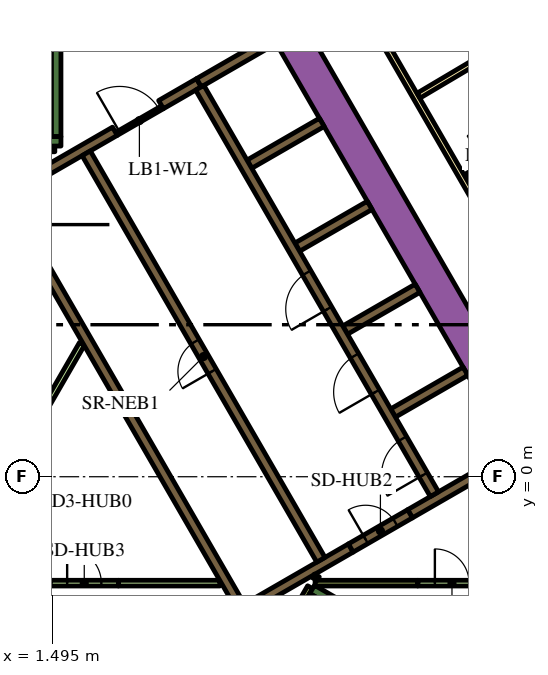
"""IFC4 building model, lengths in metres.
Left out: names, types, materials, properties, quantities, classifications, styles, units other than length and angle.
Written with IfcOpenShell. Run it as: python <this file> out.ifc"""

import sys

from ifc_helpers import new_model, si_unit, direction, frame, frame_2d, origin, place, context, subcontext, project, spatial, polyline, rectangle, outline, extrude, element, fill, save


model = new_model("IFC4")
c1 = context("Model", 3, precision=1e-05, world=origin(), true_north=direction((0.0, 1.0)))
c2 = subcontext(c1, "Body", "Model", "MODEL_VIEW")
j1 = project(units=[si_unit("LENGTHUNIT", "METRE"), si_unit("PLANEANGLEUNIT", "RADIAN")], contexts=[c1])
p1 = place(None, origin())
s1 = spatial("IfcSite", under=j1, at=p1, CompositionType="ELEMENT")
p2 = place(p1, origin())
s2 = spatial("IfcBuilding", under=s1, at=p2, CompositionType="ELEMENT")
p3 = place(p2, frame((0.0, 0.0, 126.6)))
s3 = spatial("IfcBuildingStorey", under=s2, at=p3, CompositionType="ELEMENT", Elevation=126.6)
p4 = place(p3, frame((6.776, 13.364, 0.0), z_axis=(0.0, 0.0, 1.0), x_axis=(0.500004177138, -0.8660229921, 0.0)))
e1 = element("IfcWall", 1, at=p4, inside=s3, PredefinedType="SOLIDWALL", context=c2, shape_type="SweptSolid", body=[
    extrude(rectangle(XDim=20.204, YDim=0.9, at=frame_2d((10.102, 0.0))), origin(), (0.0, 0.0, 1.0), 3.9),
])
p5 = place(p3, frame((8.334, -2.964, 0.0), z_axis=(0.0, 0.0, 1.0), x_axis=(0.866016039709, -0.500016218704, 0.0)))
e2 = element("IfcWall", 2, at=p5, inside=s3, PredefinedType="SOLIDWALL", context=c2, shape_type="SweptSolid", body=[
    extrude(rectangle(XDim=7.05, YDim=0.25, at=frame_2d((3.525, 0.0))), origin(), (0.0, 0.0, 1.0), 3.9),
])
p6 = place(p3, frame((8.163, -3.511, 0.0), z_axis=(0.0, 0.0, 1.0), x_axis=(0.500127794843, 0.865951608824, 0.0)))
e3 = element("IfcWall", 3, at=p6, inside=s3, PredefinedType="SOLIDWALL", context=c2, shape_type="SweptSolid", body=[
    extrude(rectangle(XDim=0.435, YDim=0.25, at=frame_2d((0.217, 0.0))), origin(), (0.0, 0.0, 1.0), 3.9),
])
p7 = place(p3, frame((1.6, 8.95, 0.0), z_axis=(0.0, 0.0, 1.0), x_axis=(0.0, 1.0, 0.0)))
e4 = element("IfcWall", 4, at=p7, inside=s3, PredefinedType="SOLIDWALL", context=c2, shape_type="SweptSolid", body=[
    extrude(rectangle(XDim=6.8, YDim=0.25, at=frame_2d((3.4, 0.0))), origin(), (0.0, 0.0, 1.0), 3.9),
])
p8 = place(p3, frame((1.05, 8.825, 0.0), z_axis=(0.0, 0.0, 1.0), x_axis=(1.0, 0.0, 0.0)))
e5 = element("IfcWall", 5, at=p8, inside=s3, PredefinedType="SOLIDWALL", context=c2, shape_type="SweptSolid", body=[
    extrude(rectangle(XDim=0.675, YDim=0.25, at=frame_2d((0.337, 0.0))), origin(), (0.0, 0.0, 1.0), 3.9),
])
p9 = place(p3, frame((10.464, 1.677, 0.0), z_axis=(0.0, 0.0, 1.0), x_axis=(0.86605622881, 0.499946605688, 0.0)))
e6 = element("IfcWall", 6, at=p9, inside=s3, PredefinedType="SOLIDWALL", context=c2, shape_type="SweptSolid", body=[
    extrude(rectangle(XDim=2.2, YDim=0.25, at=frame_2d((1.1, 0.0))), origin(), (0.0, 0.0, 1.0), 3.9),
])
p10 = place(p3, origin())
e7 = element("IfcWall", 7, at=p10, inside=s3, PredefinedType="SOLIDWALL", context=c2, shape_type="SweptSolid", body=[
    extrude(outline(polyline([(0.335, 6.925), (0.335, 6.925), (0.335, 7.075), (0.335, 7.075), (0.335, 7.075), (0.245, 7.075), (0.079, 7.363), (0.035, 7.439), (0.252, 7.564), (0.377, 7.348), (6.552, -3.348), (6.677, -3.564), (6.46, -3.689), (4.897, -0.981), (0.332, 6.925), (0.335, 6.925), (0.335, 6.925)])), origin(), (0.0, 0.0, 1.0), 3.9),
])
p11 = place(p3, frame((4.358, 9.791, 0.0), z_axis=(0.0, 0.0, 1.0), x_axis=(0.866079547155, 0.499906209203, 0.0)))
e8 = element("IfcWall", 8, at=p11, inside=s3, PredefinedType="SOLIDWALL", context=c2, shape_type="SweptSolid", body=[
    extrude(rectangle(XDim=1.15, YDim=0.25, at=frame_2d((0.575, 0.0))), origin(), (0.0, 0.0, 1.0), 3.9),
])
p12 = place(p3, frame((5.356, 10.367, 0.0), z_axis=(0.0, 0.0, 1.0), x_axis=(0.865978535641, 0.50008116922, 0.0)))
e9 = element("IfcWall", 9, at=p12, inside=s3, PredefinedType="SOLIDWALL", context=c2, shape_type="SweptSolid", body=[
    extrude(rectangle(XDim=2.278, YDim=0.25, at=frame_2d((1.139, 0.0))), origin(), (0.0, 0.0, 1.0), 3.9),
])
p13 = place(p3, frame((0.314, 7.456, 0.0), z_axis=(0.0, 0.0, 1.0), x_axis=(0.866013897511, 0.50001992892, 0.0)))
e10 = element("IfcWall", 10, at=p13, inside=s3, PredefinedType="SOLIDWALL", context=c2, shape_type="SweptSolid", body=[
    extrude(rectangle(XDim=3.268, YDim=0.25, at=frame_2d((1.634, 0.0))), origin(), (0.0, 0.0, 1.0), 3.9),
])
p14 = place(p3, frame((9.352, -1.875, 0.0), z_axis=(0.0, 0.0, 1.0), x_axis=(-0.866024844342, -0.500000968981, 0.0)))
e11 = element("IfcWall", 11, at=p14, inside=s3, PredefinedType="SOLIDWALL", context=c2, shape_type="SweptSolid", body=[
    extrude(rectangle(XDim=3.162, YDim=0.25, at=frame_2d((1.581, 0.0))), origin(), (0.0, 0.0, 1.0), 3.9),
])
for number, where, z_axis, x_axis in (
    (12, (6.684, 8.224, 0.0), (0.0, 0.0, 1.0), (0.866, 0.5, 0.0)),
    (13, (7.944, 6.041, 0.0), (0.0, 0.0, 1.0), (0.866, 0.5, 0.0)),
    (14, (9.204, 3.859, 0.0), (0.0, 0.0, 1.0), (0.866, 0.5, 0.0)),
):
    element("IfcWall", number, at=place(p3, frame(where, z_axis=z_axis, x_axis=x_axis)), inside=s3, PredefinedType="SOLIDWALL", context=c2, shape_type="SweptSolid", body=[
        extrude(rectangle(XDim=2.2, YDim=0.25, at=frame_2d((1.1, 0.0))), origin(), (0.0, 0.0, 1.0), 3.9),
    ])
p15 = place(p3, frame((10.911, -0.975, 0.0), z_axis=(0.0, 0.0, 1.0), x_axis=(0.866046979468, 0.499962627957, 0.0)))
e15 = element("IfcWall", 15, at=p15, inside=s3, PredefinedType="SOLIDWALL", context=c2, shape_type="SweptSolid", body=[
    extrude(rectangle(XDim=3.138, YDim=0.25, at=frame_2d((1.569, 0.0))), origin(), (0.0, 0.0, 1.0), 3.9),
])
p16 = place(p3, frame((8.412, -2.8, 0.0), z_axis=(0.0, 0.0, 1.0), x_axis=(1.0, 0.0, 0.0)))
e16 = element("IfcWall", 16, at=p16, inside=s3, PredefinedType="PARTITIONING", context=c2, shape_type="SweptSolid", body=[
    extrude(rectangle(XDim=2.702, YDim=0.15, at=frame_2d((1.351, 0.0))), origin(), (0.0, 0.0, 1.0), 3.9),
])
p17 = place(p3, frame((8.459, -2.599, 0.0), z_axis=(0.0, 0.0, 1.0), x_axis=(-0.501919277433, -0.864914469148, 0.0)))
e17 = element("IfcWall", 17, at=p17, inside=s3, PredefinedType="PARTITIONING", context=c2, shape_type="SweptSolid", body=[
    extrude(rectangle(XDim=0.109, YDim=0.15, at=frame_2d((0.054, 0.0))), origin(), (0.0, 0.0, 1.0), 3.9),
])
p18 = place(p3, frame((8.281, -2.907, 0.0), z_axis=(0.0, 0.0, 1.0), x_axis=(-0.500193841991, -0.86591346013, 0.0)))
e18 = element("IfcWall", 18, at=p18, inside=s3, PredefinedType="PARTITIONING", context=c2, shape_type="SweptSolid", body=[
    extrude(rectangle(XDim=0.583, YDim=0.15, at=frame_2d((0.292, 0.0))), origin(), (0.0, 0.0, 1.0), 3.9),
])
p19 = place(p3, frame((3.238, -2.8, 0.0), z_axis=(0.0, 0.0, 1.0), x_axis=(1.0, 0.0, 0.0)))
e19 = element("IfcWall", 19, at=p19, inside=s3, PredefinedType="PARTITIONING", context=c2, shape_type="SweptSolid", body=[
    extrude(rectangle(XDim=2.672, YDim=0.15, at=frame_2d((1.336, 0.0))), origin(), (0.0, 0.0, 1.0), 2.75),
])
p20 = place(p3, frame((1.016, 1.309, 0.0), z_axis=(0.0, 0.0, 1.0), x_axis=(0.49998231768, 0.866035612436, 0.0)))
e20 = element("IfcWall", 20, at=p20, inside=s3, PredefinedType="PARTITIONING", context=c2, shape_type="SweptSolid", body=[
    extrude(rectangle(XDim=2.521, YDim=0.15, at=frame_2d((1.26, 0.0))), origin(), (0.0, 0.0, 1.0), 2.75),
])
p21 = place(p3, frame((1.05, 8.625, 0.0), z_axis=(0.0, 0.0, 1.0), x_axis=(1.0, 0.0, 0.0)))
e21 = element("IfcWall", 21, at=p21, inside=s3, PredefinedType="PARTITIONING", context=c2, shape_type="SweptSolid", body=[
    extrude(rectangle(XDim=0.514, YDim=0.15, at=frame_2d((0.257, 0.0))), origin(), (0.0, 0.0, 1.0), 2.75),
])
p22 = place(p3, frame((11.553, -0.46, 0.0), z_axis=(0.0, 0.0, 1.0), x_axis=(-0.500006514828, 0.866021642414, 0.0)))
e22 = element("IfcWall", 22, at=p22, inside=s3, PredefinedType="SOLIDWALL", context=c2, shape_type="SweptSolid", body=[
    extrude(rectangle(XDim=12.35, YDim=0.25, at=frame_2d((6.175, 0.0))), origin(), (0.0, 0.0, 1.0), 3.9),
])
p23 = place(p22, frame((0.585, 0.0, 0.0)))
e23 = element("IfcOpeningElement", 23, at=p23, cuts=e22, PredefinedType="OPENING", context=c2, shape_type="SweptSolid", body=[
    extrude(rectangle(XDim=1.1, YDim=2.1, at=frame_2d((0.55, 1.05))), frame((0.0, 0.135, 0.0), z_axis=(0.0, -1.0, 0.0), x_axis=(1.0, 0.0, 0.0)), (0.0, 0.0, 1.0), 0.27),
])
p24 = place(p22, frame((3.105, 0.0, 0.0)))
e24 = element("IfcOpeningElement", 24, at=p24, cuts=e22, PredefinedType="OPENING", context=c2, shape_type="SweptSolid", body=[
    extrude(rectangle(XDim=1.1, YDim=2.1, at=frame_2d((0.55, 1.05))), frame((0.0, 0.135, 0.0), z_axis=(0.0, -1.0, 0.0), x_axis=(1.0, 0.0, 0.0)), (0.0, 0.0, 1.0), 0.27),
])
p25 = place(p22, frame((5.625, 0.0, 0.0)))
e25 = element("IfcOpeningElement", 25, at=p25, cuts=e22, PredefinedType="OPENING", context=c2, shape_type="SweptSolid", body=[
    extrude(rectangle(XDim=1.1, YDim=2.1, at=frame_2d((0.55, 1.05))), frame((0.0, 0.135, 0.0), z_axis=(0.0, -1.0, 0.0), x_axis=(1.0, 0.0, 0.0)), (0.0, 0.0, 1.0), 0.27),
])
p26 = place(p3, frame((8.565, -2.185, 0.0), z_axis=(0.0, 0.0, 1.0), x_axis=(-0.499997954832, 0.866026584559, 0.0)))
e26 = element("IfcWall", 26, at=p26, inside=s3, PredefinedType="SOLIDWALL", context=c2, shape_type="SweptSolid", body=[
    extrude(rectangle(XDim=12.35, YDim=0.25, at=frame_2d((6.175, 0.0))), origin(), (0.0, 0.0, 1.0), 3.9),
])
p27 = place(p26, frame((5.725, 0.0, 0.0)))
e27 = element("IfcOpeningElement", 27, at=p27, cuts=e26, PredefinedType="OPENING", context=c2, shape_type="SweptSolid", body=[
    extrude(rectangle(XDim=0.9, YDim=2.1, at=frame_2d((0.45, 1.05))), frame((0.0, 0.135, 0.0), z_axis=(0.0, -1.0, 0.0), x_axis=(1.0, 0.0, 0.0)), (0.0, 0.0, 1.0), 0.27),
])
p28 = place(p3, frame((3.183, 9.02, 0.0), z_axis=(0.0, 0.0, 1.0), x_axis=(0.866034573852, 0.49998411664, 0.0)))
e28 = element("IfcWall", 28, at=p28, inside=s3, PredefinedType="PARTITIONING", context=c2, shape_type="SweptSolid", body=[
    extrude(rectangle(XDim=1.4, YDim=0.09, at=frame_2d((0.7, 0.0))), origin(), (0.0, 0.0, 1.0), 2.75),
])
p29 = place(p28, frame((0.1, 0.0, 0.0)))
e29 = element("IfcOpeningElement", 29, at=p29, cuts=e28, PredefinedType="OPENING", context=c2, shape_type="SweptSolid", body=[
    extrude(rectangle(XDim=1.2, YDim=2.1, at=frame_2d((0.6, 1.05))), frame((0.0, 0.055, 0.0), z_axis=(0.0, -1.0, 0.0), x_axis=(1.0, 0.0, 0.0)), (0.0, 0.0, 1.0), 0.11),
])
p30 = place(p3, frame((9.352, -1.875, 0.0), z_axis=(0.0, 0.0, 1.0), x_axis=(0.865989075817, 0.500062916607, 0.0)))
e30 = element("IfcWall", 30, at=p30, inside=s3, PredefinedType="SOLIDWALL", context=c2, shape_type="SweptSolid", body=[
    extrude(rectangle(XDim=1.8, YDim=0.25, at=frame_2d((0.9, 0.0))), origin(), (0.0, 0.0, 1.0), 3.9),
])
p31 = place(p30, frame((0.45, 0.0, 0.0)))
e31 = element("IfcOpeningElement", 31, at=p31, cuts=e30, PredefinedType="OPENING", context=c2, shape_type="SweptSolid", body=[
    extrude(rectangle(XDim=0.9, YDim=2.1, at=frame_2d((0.45, 1.05))), frame((0.0, 0.135, 0.0), z_axis=(0.0, -1.0, 0.0), x_axis=(1.0, 0.0, 0.0)), (0.0, 0.0, 1.0), 0.27),
])
p32 = place(p3, frame((1.438, -2.8, 0.0), z_axis=(0.0, 0.0, 1.0), x_axis=(1.0, 0.0, 0.0)))
e32 = element("IfcWall", 32, at=p32, inside=s3, PredefinedType="PARTITIONING", context=c2, shape_type="SweptSolid", body=[
    extrude(rectangle(XDim=1.8, YDim=0.15, at=frame_2d((0.9, 0.0))), origin(), (0.0, 0.0, 1.0), 2.75),
])
p33 = place(p32, frame((0.45, 0.0, 0.0)))
e33 = element("IfcOpeningElement", 33, at=p33, cuts=e32, PredefinedType="OPENING", context=c2, shape_type="SweptSolid", body=[
    extrude(rectangle(XDim=0.9, YDim=2.1, at=frame_2d((0.45, 1.05))), frame((0.0, 0.085, 0.0), z_axis=(0.0, -1.0, 0.0), x_axis=(1.0, 0.0, 0.0)), (0.0, 0.0, 1.0), 0.17),
])
p34 = place(p3, frame((11.115, -2.8, 0.0), z_axis=(0.0, 0.0, 1.0), x_axis=(1.0, 0.0, 0.0)))
e34 = element("IfcWall", 34, at=p34, inside=s3, PredefinedType="PARTITIONING", context=c2, shape_type="SweptSolid", body=[
    extrude(rectangle(XDim=1.8, YDim=0.15, at=frame_2d((0.9, 0.0))), origin(), (0.0, 0.0, 1.0), 2.75),
])
p35 = place(p34, frame((0.45, 0.0, 0.0)))
e35 = element("IfcOpeningElement", 35, at=p35, cuts=e34, PredefinedType="OPENING", context=c2, shape_type="SweptSolid", body=[
    extrude(rectangle(XDim=0.9, YDim=2.1, at=frame_2d((0.45, 1.05))), frame((0.0, 0.085, 0.0), z_axis=(0.0, -1.0, 0.0), x_axis=(1.0, 0.0, 0.0)), (0.0, 0.0, 1.0), 0.17),
])
p36 = place(p3, frame((6.163, 18.475, 0.0), z_axis=(0.0, 0.0, 1.0), x_axis=(0.500001317485, -0.866024643133, 0.0)))
e36 = element("IfcWall", 36, at=p36, inside=s3, PredefinedType="PARTITIONING", context=c2, shape_type="SweptSolid", body=[
    extrude(rectangle(XDim=25.767, YDim=0.15, at=frame_2d((12.883, 0.0))), origin(), (0.0, 0.0, 1.0), 2.75),
])
p37 = place(p36, frame((19.306, 0.0, 0.0)))
e37 = element("IfcOpeningElement", 37, at=p37, cuts=e36, PredefinedType="OPENING", context=c2, shape_type="SweptSolid", body=[
    extrude(rectangle(XDim=1.0, YDim=2.1, at=frame_2d((0.5, 1.05))), frame((0.0, 0.085, 0.0), z_axis=(0.0, -1.0, 0.0), x_axis=(1.0, 0.0, 0.0)), (0.0, 0.0, 1.0), 0.17),
])
p38 = place(p36, frame((17.999, 0.0, 0.0)))
e38 = element("IfcOpeningElement", 38, at=p38, cuts=e36, PredefinedType="OPENING", context=c2, shape_type="SweptSolid", body=[
    extrude(rectangle(XDim=1.0, YDim=2.1, at=frame_2d((0.5, 1.05))), frame((0.0, 0.085, 0.0), z_axis=(0.0, -1.0, 0.0), x_axis=(1.0, 0.0, 0.0)), (0.0, 0.0, 1.0), 0.17),
])
p39 = place(p36, frame((0.596, 0.0, 0.0)))
e39 = element("IfcOpeningElement", 39, at=p39, cuts=e36, PredefinedType="OPENING", context=c2, shape_type="SweptSolid", body=[
    extrude(rectangle(XDim=1.0, YDim=2.1, at=frame_2d((0.5, 1.05))), frame((0.0, 0.085, 0.0), z_axis=(0.0, -1.0, 0.0), x_axis=(1.0, 0.0, 0.0)), (0.0, 0.0, 1.0), 0.17),
])
p40 = place(p3, frame((17.379, 13.731, 0.0), z_axis=(0.0, 0.0, 1.0), x_axis=(-0.860132461691, -0.510070728768, 0.0)))
e40 = element("IfcWall", 40, at=p40, inside=s3, PredefinedType="PARTITIONING", context=c2, shape_type="SweptSolid", body=[
    extrude(rectangle(XDim=7.257, YDim=0.15, at=frame_2d((3.628, 0.0))), origin(), (0.0, 0.0, 1.0), 2.75),
])
p41 = place(p3, frame((12.355, 7.9, 0.0), z_axis=(0.0, 0.0, 1.0), x_axis=(0.866034573852, 0.49998411664, 0.0)))
e41 = element("IfcWall", 41, at=p41, inside=s3, PredefinedType="PARTITIONING", context=c2, shape_type="SweptSolid", body=[
    extrude(rectangle(XDim=2.8, YDim=0.1, at=frame_2d((1.4, 0.0))), origin(), (0.0, 0.0, 1.0), 2.75),
])
p42 = place(p41, frame((0.6, 0.0, 0.0)))
e42 = element("IfcOpeningElement", 42, at=p42, cuts=e41, PredefinedType="OPENING", context=c2, shape_type="SweptSolid", body=[
    extrude(rectangle(XDim=0.9, YDim=2.1, at=frame_2d((0.45, 1.05))), frame((0.0, 0.06, 0.0), z_axis=(0.0, -1.0, 0.0), x_axis=(1.0, 0.0, 0.0)), (0.0, 0.0, 1.0), 0.12),
])
p43 = place(p23, origin())
e43 = element("IfcDoor", 43, at=p43, inside=s3, OperationType="DOUBLE_DOOR_SLIDING", PredefinedType="DOOR", context=c2, shape_type="SweptSolid", body=[
    extrude(rectangle(XDim=1.1, YDim=2.1, at=frame_2d((0.55, 1.05))), frame((0.0, 0.025, 0.0), z_axis=(0.0, -1.0, 0.0), x_axis=(1.0, 0.0, 0.0)), (0.0, 0.0, 1.0), 0.05),
])
fill(e23, e43)
p44 = place(p24, origin())
e44 = element("IfcDoor", 44, at=p44, inside=s3, OperationType="DOUBLE_DOOR_SLIDING", PredefinedType="DOOR", context=c2, shape_type="SweptSolid", body=[
    extrude(rectangle(XDim=1.1, YDim=2.1, at=frame_2d((0.55, 1.05))), frame((0.0, 0.025, 0.0), z_axis=(0.0, -1.0, 0.0), x_axis=(1.0, 0.0, 0.0)), (0.0, 0.0, 1.0), 0.05),
])
fill(e24, e44)
p45 = place(p25, origin())
e45 = element("IfcDoor", 45, at=p45, inside=s3, OperationType="DOUBLE_DOOR_SLIDING", PredefinedType="DOOR", context=c2, shape_type="SweptSolid", body=[
    extrude(rectangle(XDim=1.1, YDim=2.1, at=frame_2d((0.55, 1.05))), frame((0.0, 0.025, 0.0), z_axis=(0.0, -1.0, 0.0), x_axis=(1.0, 0.0, 0.0)), (0.0, 0.0, 1.0), 0.05),
])
fill(e25, e45)
p46 = place(p27, origin())
e46 = element("IfcDoor", 46, at=p46, inside=s3, OperationType="SINGLE_SWING_LEFT", PredefinedType="DOOR", context=c2, shape_type="SweptSolid", body=[
    extrude(rectangle(XDim=0.9, YDim=2.1, at=frame_2d((0.45, 1.05))), frame((0.0, 0.025, 0.0), z_axis=(0.0, -1.0, 0.0), x_axis=(1.0, 0.0, 0.0)), (0.0, 0.0, 1.0), 0.05),
])
fill(e27, e46)
p47 = place(p29, origin())
e47 = element("IfcDoor", 47, at=p47, inside=s3, OperationType="SINGLE_SWING_LEFT", PredefinedType="DOOR", context=c2, shape_type="SweptSolid", body=[
    extrude(rectangle(XDim=1.2, YDim=2.1, at=frame_2d((0.6, 1.05))), frame((0.0, 0.025, 0.0), z_axis=(0.0, -1.0, 0.0), x_axis=(1.0, 0.0, 0.0)), (0.0, 0.0, 1.0), 0.05),
])
fill(e29, e47)
p48 = place(p31, origin())
e48 = element("IfcDoor", 48, at=p48, inside=s3, OperationType="SINGLE_SWING_LEFT", PredefinedType="DOOR", context=c2, shape_type="SweptSolid", body=[
    extrude(rectangle(XDim=0.9, YDim=2.1, at=frame_2d((0.45, 1.05))), frame((0.0, 0.025, 0.0), z_axis=(0.0, -1.0, 0.0), x_axis=(1.0, 0.0, 0.0)), (0.0, 0.0, 1.0), 0.05),
])
fill(e31, e48)
p49 = place(p33, origin())
e49 = element("IfcDoor", 49, at=p49, inside=s3, OperationType="SINGLE_SWING_LEFT", PredefinedType="DOOR", context=c2, shape_type="SweptSolid", body=[
    extrude(rectangle(XDim=0.9, YDim=2.1, at=frame_2d((0.45, 1.05))), frame((0.0, 0.025, 0.0), z_axis=(0.0, -1.0, 0.0), x_axis=(1.0, 0.0, 0.0)), (0.0, 0.0, 1.0), 0.05),
])
fill(e33, e49)
p50 = place(p35, origin())
e50 = element("IfcDoor", 50, at=p50, inside=s3, OperationType="SINGLE_SWING_LEFT", PredefinedType="DOOR", context=c2, shape_type="SweptSolid", body=[
    extrude(rectangle(XDim=0.9, YDim=2.1, at=frame_2d((0.45, 1.05))), frame((0.0, 0.025, 0.0), z_axis=(0.0, -1.0, 0.0), x_axis=(1.0, 0.0, 0.0)), (0.0, 0.0, 1.0), 0.05),
])
fill(e35, e50)
save(model, sys.argv[1])
